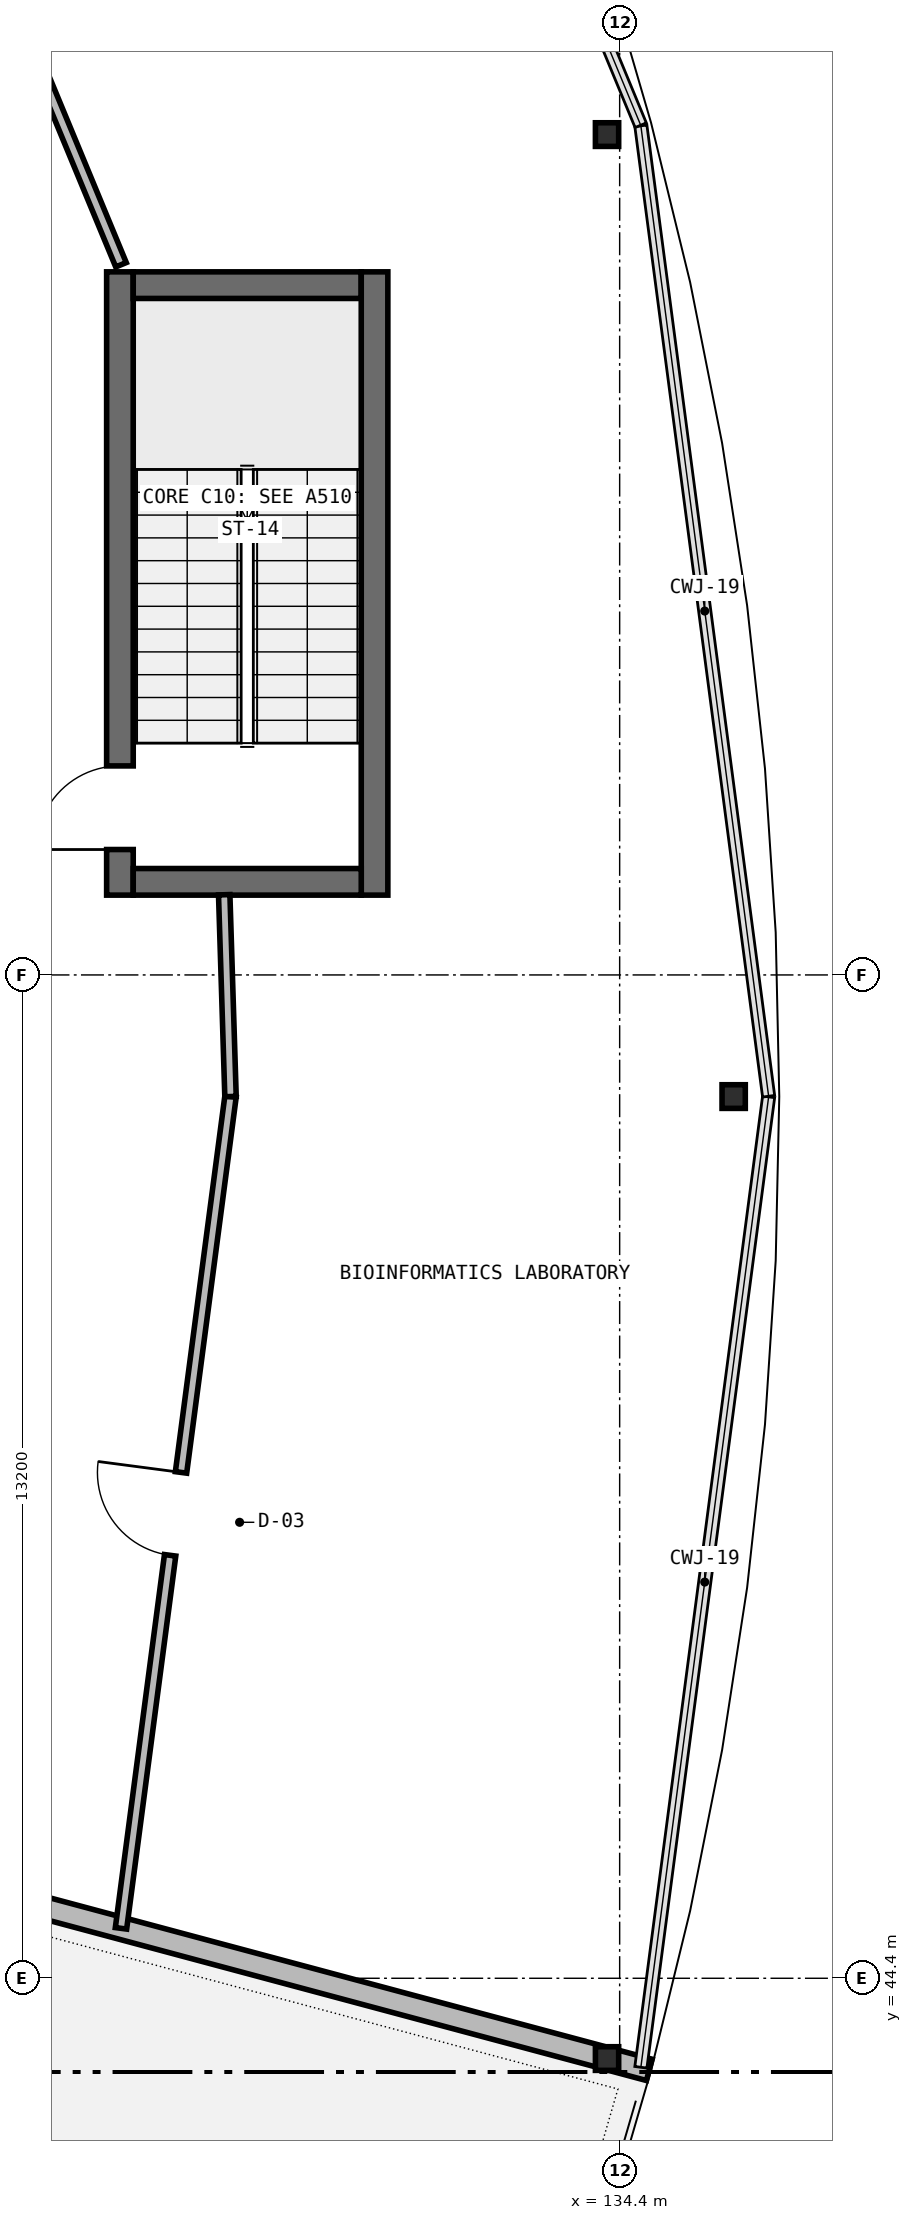
"""IFC4 building model, lengths in metres.
Left out: names, types, materials, properties, quantities, classifications, styles, units other than length and angle.
Written with IfcOpenShell. Run it as: python <this file> out.ifc"""

import sys

from ifc_helpers import new_model, si_unit, direction, frame, frame_2d, origin, origin_2d, place, context, subcontext, project, spatial, rectangle, i_section, extrude, element, fill, save


model = new_model("IFC4")
c1 = context("Model", 3, precision=1e-05, world=origin(), true_north=direction((0.0, 1.0)))
c2 = subcontext(c1, "Body", "Model", "MODEL_VIEW")
j1 = project(units=[si_unit("LENGTHUNIT", "METRE"), si_unit("PLANEANGLEUNIT", "RADIAN")], contexts=[c1])
p1 = place(None, origin())
s1 = spatial("IfcSite", under=j1, at=p1, CompositionType="ELEMENT")
p2 = place(p1, origin())
s2 = spatial("IfcBuilding", under=s1, at=p2, CompositionType="ELEMENT")
p3 = place(p2, frame((0.0, 0.0, 14.35)))
s3 = spatial("IfcBuildingStorey", under=s2, at=p3, CompositionType="ELEMENT", Elevation=14.35)
p4 = place(p3, frame((127.825, 58.65, 0.0), z_axis=(0.0, 0.0, 1.0), x_axis=(0.0, 1.0, 0.0)))
e1 = element("IfcWall", 1, at=p4, inside=s3, PredefinedType="SHEAR", context=c2, shape_type="SweptSolid", body=[
    extrude(rectangle(XDim=8.2, YDim=0.35, at=frame_2d((4.1, 0.0))), origin(), (0.0, 0.0, 1.0), 4.55),
])
p5 = place(p4, frame((0.6, 0.0, 0.0)))
e2 = element("IfcOpeningElement", 2, at=p5, cuts=e1, PredefinedType="OPENING", context=c2, shape_type="SweptSolid", body=[
    extrude(rectangle(XDim=1.1, YDim=2.15, at=frame_2d((0.55, 1.075))), frame((0.0, 0.185, 0.0), z_axis=(0.0, -1.0, 0.0), x_axis=(1.0, 0.0, 0.0)), (0.0, 0.0, 1.0), 0.37),
])
p6 = place(p3, frame((128.0, 66.675, 0.0), z_axis=(0.0, 0.0, 1.0), x_axis=(1.0, 0.0, 0.0)))
e3 = element("IfcWall", 3, at=p6, inside=s3, PredefinedType="SHEAR", context=c2, shape_type="SweptSolid", body=[
    extrude(rectangle(XDim=3.0, YDim=0.35, at=frame_2d((1.5, 0.0))), origin(), (0.0, 0.0, 1.0), 4.55),
])
p7 = place(p3, frame((131.175, 66.85, 0.0), z_axis=(0.0, 0.0, 1.0), x_axis=(0.0, -1.0, 0.0)))
e4 = element("IfcWall", 4, at=p7, inside=s3, PredefinedType="SHEAR", context=c2, shape_type="SweptSolid", body=[
    extrude(rectangle(XDim=8.2, YDim=0.35, at=frame_2d((4.1, 0.0))), origin(), (0.0, 0.0, 1.0), 4.55),
])
p8 = place(p3, frame((131.0, 58.825, 0.0), z_axis=(0.0, 0.0, 1.0), x_axis=(-1.0, 0.0, 0.0)))
e5 = element("IfcWall", 5, at=p8, inside=s3, PredefinedType="SHEAR", context=c2, shape_type="SweptSolid", body=[
    extrude(rectangle(XDim=3.0, YDim=0.35, at=frame_2d((1.5, 0.0))), origin(), (0.0, 0.0, 1.0), 4.55),
])
for number, where, z_axis, x_axis in (
    (6, (135.9, 56.0, 0.0), (0.0, 0.0, 1.0), (1.0, 0.0, 0.0)),
    (7, (134.234, 68.656, 0.0), (0.0, 0.0, 1.0), (1.0, 0.0, 0.0)),
    (8, (134.234, 43.344, 0.0), (0.0, 0.0, 1.0), (1.0, 0.0, 0.0)),
):
    element("IfcColumn", number, at=place(p3, frame(where, z_axis=z_axis, x_axis=x_axis)), inside=s3, PredefinedType="COLUMN", context=c2, shape_type="SweptSolid", body=[
        extrude(i_section(OverallWidth=0.306, OverallDepth=0.311, WebThickness=0.011, FlangeThickness=0.017, at=origin_2d()), origin(), (0.0, 0.0, 1.0), 4.55),
    ])
p9 = place(p3, frame((124.211, 46.029, 0.0), z_axis=(0.0, 0.0, 1.0), x_axis=(0.965941286082, -0.258761341476, 0.0)))
e9 = element("IfcWall", 9, at=p9, inside=s3, PredefinedType="SOLIDWALL", context=c2, shape_type="SweptSolid", body=[
    extrude(rectangle(XDim=10.952, YDim=0.29, at=frame_2d((5.476, 0.0))), origin(), (0.0, 0.0, 1.0), 3.687),
])
p10 = place(p9, frame((1.2, 0.0, 0.0)))
e10 = element("IfcOpeningElement", 10, at=p10, cuts=e9, PredefinedType="OPENING", context=c2, shape_type="SweptSolid", body=[
    extrude(rectangle(XDim=1.4, YDim=2.2, at=frame_2d((0.7, 1.1))), frame((0.0, 0.155, 0.0), z_axis=(0.0, -1.0, 0.0), x_axis=(1.0, 0.0, 0.0)), (0.0, 0.0, 1.0), 0.31),
])
p11 = place(p3, frame((127.839, 45.057, 0.0), z_axis=(0.0, 0.0, 1.0), x_axis=(0.130546632054, 0.991442170204, 0.0)))
e11 = element("IfcWall", 11, at=p11, inside=s3, PredefinedType="PARTITIONING", context=c2, shape_type="SweptSolid", body=[
    extrude(rectangle(XDim=11.038, YDim=0.15, at=frame_2d((5.519, 0.0))), origin(), (0.0, 0.0, 1.0), 3.691),
])
p12 = place(p11, frame((4.95, 0.0, 0.0)))
e12 = element("IfcOpeningElement", 12, at=p12, cuts=e11, PredefinedType="OPENING", context=c2, shape_type="SweptSolid", body=[
    extrude(rectangle(XDim=1.1, YDim=2.2, at=frame_2d((0.55, 1.1))), frame((0.0, 0.085, 0.0), z_axis=(0.0, -1.0, 0.0), x_axis=(1.0, 0.0, 0.0)), (0.0, 0.0, 1.0), 0.17),
])
p13 = place(p3, frame((129.28, 56.0, 0.0), z_axis=(0.0, 0.0, 1.0), x_axis=(-0.031249099163, 0.999511627647, 0.0)))
e13 = element("IfcWall", 13, at=p13, inside=s3, PredefinedType="PARTITIONING", context=c2, shape_type="SweptSolid", body=[
    extrude(rectangle(XDim=2.656, YDim=0.15, at=frame_2d((1.328, 0.0))), origin(), (0.0, 0.0, 1.0), 4.3),
])
p14 = place(p3, frame((127.839, 66.943, 0.0), z_axis=(0.0, 0.0, 1.0), x_axis=(-0.382644845446, 0.923895514793, 0.0)))
e14 = element("IfcWall", 14, at=p14, inside=s3, PredefinedType="PARTITIONING", context=c2, shape_type="SweptSolid", body=[
    extrude(rectangle(XDim=11.037, YDim=0.15, at=frame_2d((5.518, 0.0))), origin(), (0.0, 0.0, 1.0), 3.738),
])
p15 = place(p14, frame((4.95, 0.0, 0.0)))
e15 = element("IfcOpeningElement", 15, at=p15, cuts=e14, PredefinedType="OPENING", context=c2, shape_type="SweptSolid", body=[
    extrude(rectangle(XDim=1.1, YDim=2.2, at=frame_2d((0.55, 1.1))), frame((0.0, 0.085, 0.0), z_axis=(0.0, -1.0, 0.0), x_axis=(1.0, 0.0, 0.0)), (0.0, 0.0, 1.0), 0.17),
])
p16 = place(p5, origin())
e16 = element("IfcDoor", 16, at=p16, inside=s3, OperationType="SINGLE_SWING_LEFT", PredefinedType="DOOR", context=c2, shape_type="SweptSolid", body=[
    extrude(rectangle(XDim=1.1, YDim=2.15, at=frame_2d((0.55, 1.075))), frame((0.0, 0.025, 0.0), z_axis=(0.0, -1.0, 0.0), x_axis=(1.0, 0.0, 0.0)), (0.0, 0.0, 1.0), 0.05),
])
fill(e2, e16)
p17 = place(p12, origin())
e17 = element("IfcDoor", 17, at=p17, inside=s3, OperationType="SINGLE_SWING_RIGHT", PredefinedType="DOOR", context=c2, shape_type="SweptSolid", body=[
    extrude(rectangle(XDim=1.1, YDim=2.2, at=frame_2d((0.55, 1.1))), frame((0.0, 0.025, 0.0), z_axis=(0.0, -1.0, 0.0), x_axis=(1.0, 0.0, 0.0)), (0.0, 0.0, 1.0), 0.05),
])
fill(e12, e17)
save(model, sys.argv[1])
